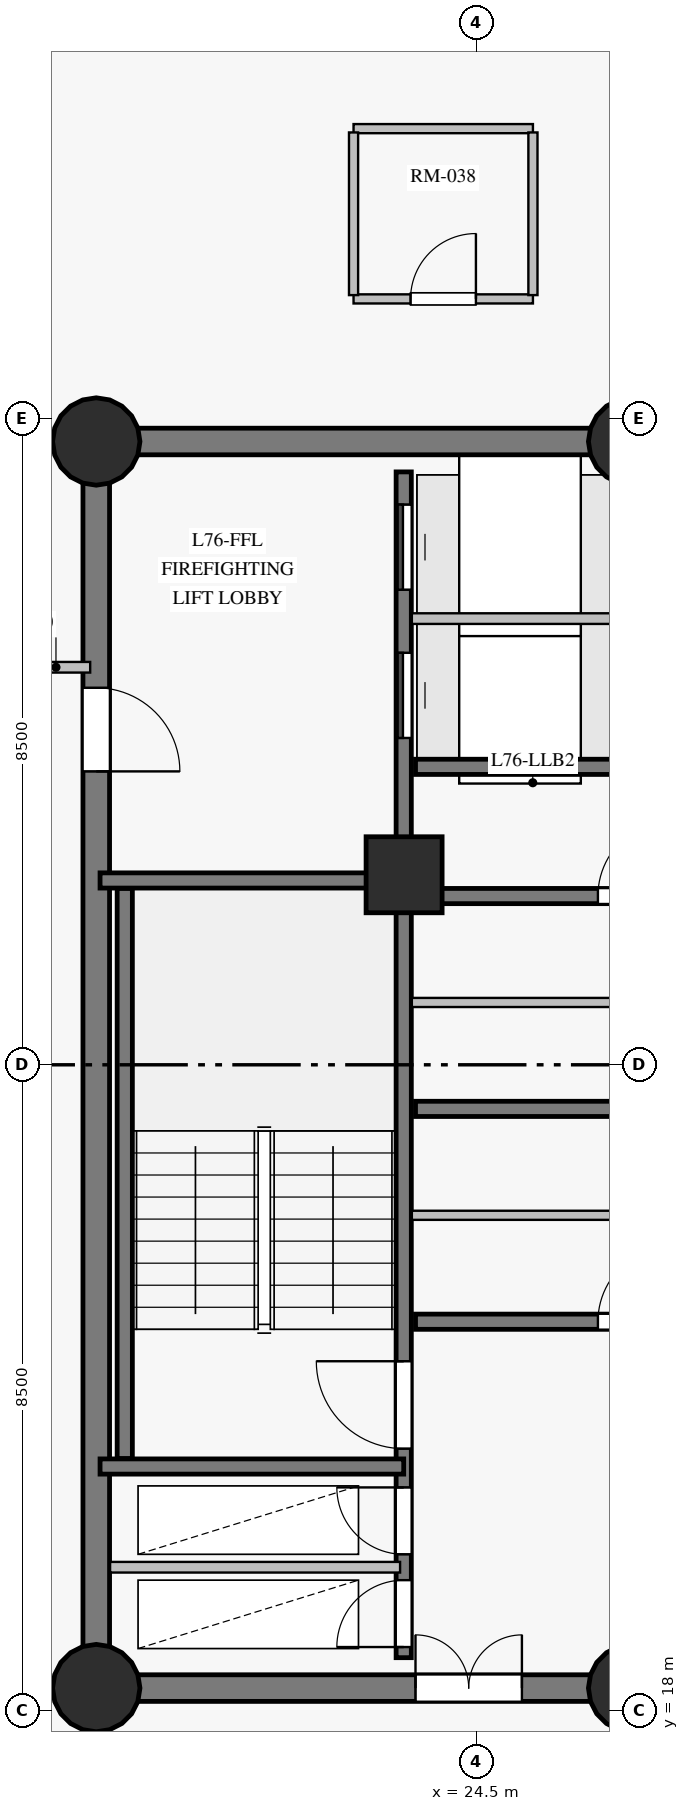
"""IFC4 building model, lengths in metres.
Left out: names, types, materials, properties, quantities, classifications, styles, units other than length and angle.
Written with IfcOpenShell. Run it as: python <this file> out.ifc"""

import sys

from ifc_helpers import new_model, si_unit, direction, frame, frame_2d, origin, origin_with_axes, origin_2d, place, context, subcontext, project, spatial, rectangle, circle, extrude, source, transform, mapped, element, fill, save


model = new_model("IFC4")
c1 = context("Model", 3, precision=1e-05, world=origin(), true_north=direction((0.0, 1.0)))
c2 = subcontext(c1, "Body", "Model", "MODEL_VIEW")
j1 = project(units=[si_unit("LENGTHUNIT", "METRE"), si_unit("PLANEANGLEUNIT", "RADIAN")], contexts=[c1])
p1 = place(None, origin())
s1 = spatial("IfcSite", under=j1, at=p1, CompositionType="ELEMENT")
p2 = place(p1, origin())
s2 = spatial("IfcBuilding", under=s1, at=p2, CompositionType="ELEMENT")
p3 = place(p2, frame((0.0, 0.0, 256.55)))
s3 = spatial("IfcBuildingStorey", under=s2, at=p3, CompositionType="ELEMENT", Elevation=256.55)
p4 = place(p3, frame((19.5, 18.3, 0.0), z_axis=(0.0, 0.0, 1.0), x_axis=(1.0, 0.0, 0.0)))
e1 = element("IfcWall", 1, at=p4, inside=s3, PredefinedType="SHEAR", context=c2, shape_type="SweptSolid", body=[
    extrude(rectangle(XDim=7.05, YDim=0.35, at=frame_2d((3.525, 0.0))), origin(), (0.0, 0.0, 1.0), 2.85),
])
p5 = place(p4, frame((4.2, 0.0, 0.0)))
e2 = element("IfcOpeningElement", 2, at=p5, cuts=e1, PredefinedType="OPENING", context=c2, shape_type="SweptSolid", body=[
    extrude(rectangle(XDim=1.4, YDim=2.2, at=frame_2d((0.7, 1.1))), frame((0.0, 0.185, 0.0), z_axis=(0.0, -1.0, 0.0), x_axis=(1.0, 0.0, 0.0)), (0.0, 0.0, 1.0), 0.37),
])
p6 = place(p3, frame((26.55, 34.7, 0.0), z_axis=(0.0, 0.0, 1.0), x_axis=(-1.0, 0.0, 0.0)))
e3 = element("IfcWall", 3, at=p6, inside=s3, PredefinedType="SHEAR", context=c2, shape_type="SweptSolid", body=[
    extrude(rectangle(XDim=7.05, YDim=0.35, at=frame_2d((3.525, 0.0))), origin(), (0.0, 0.0, 1.0), 2.85),
])
p7 = place(p3, frame((19.5, 34.7, 0.0), z_axis=(0.0, 0.0, 1.0), x_axis=(0.0, -1.0, 0.0)))
e4 = element("IfcWall", 4, at=p7, inside=s3, PredefinedType="SHEAR", context=c2, shape_type="SweptSolid", body=[
    extrude(rectangle(XDim=16.4, YDim=0.35, at=frame_2d((8.2, 0.0))), origin(), (0.0, 0.0, 1.0), 2.85),
])
p8 = place(p7, frame((3.24, 0.0, 0.0)))
e5 = element("IfcOpeningElement", 5, at=p8, cuts=e4, PredefinedType="OPENING", context=c2, shape_type="SweptSolid", body=[
    extrude(rectangle(XDim=1.1, YDim=2.15, at=frame_2d((0.55, 1.075))), frame((0.0, 0.185, 0.0), z_axis=(0.0, -1.0, 0.0), x_axis=(1.0, 0.0, 0.0)), (0.0, 0.0, 1.0), 0.37),
])
m1 = source(origin_with_axes(), c2, "Body", "SweptSolid", [
    extrude(circle(Radius=0.575, at=origin_2d()), origin(), (0.0, 0.0, 1.0), 3.05),
])
for number, where, z_axis, x_axis in (
    (6, (19.5, 18.3, 0.0), (0.0, 0.0, 1.0), (1.0, 0.0, 0.0)),
    (7, (26.55, 18.3, 0.0), (0.0, 0.0, 1.0), (1.0, 0.0, 0.0)),
    (8, (19.5, 34.7, 0.0), (0.0, 0.0, 1.0), (1.0, 0.0, 0.0)),
    (9, (26.55, 34.7, 0.0), (0.0, 0.0, 1.0), (1.0, 0.0, 0.0)),
):
    element("IfcColumn", number, at=place(p3, frame(where, z_axis=z_axis, x_axis=x_axis)), inside=s3, PredefinedType="COLUMN", context=c2, shape_type="MappedRepresentation", body=[
        mapped(m1, transform((0.0, 0.0, 0.0), scale=1.0)),
    ])
m2 = source(origin_with_axes(), c2, "Body", "SweptSolid", [
    extrude(rectangle(XDim=1.0, YDim=1.0, at=origin_2d()), origin(), (0.0, 0.0, 1.0), 3.05),
])
p9 = place(p3, frame((23.55, 29.0, 0.0), z_axis=(0.0, 0.0, 1.0), x_axis=(1.0, 0.0, 0.0)))
e10 = element("IfcColumn", 10, at=p9, inside=s3, PredefinedType="COLUMN", context=c2, shape_type="MappedRepresentation", body=[
    mapped(m2, transform((0.0, 0.0, 0.0), scale=1.0)),
])
p10 = place(p3, frame((25.545, 45.394, 0.0), z_axis=(0.0, 0.0, 1.0), x_axis=(-0.841254258946, -0.540639687597, 0.0)))
e11 = element("IfcWall", 11, at=p10, inside=s3, PredefinedType="SOLIDWALL", context=c2, shape_type="SweptSolid", body=[
    extrude(rectangle(XDim=12.036, YDim=0.28, at=frame_2d((6.018, 0.0))), origin(), (0.0, 0.0, 1.0), 2.85),
])
p11 = place(p10, frame((1.459, 0.0, 0.85)))
e12 = element("IfcOpeningElement", 12, at=p11, cuts=e11, PredefinedType="OPENING", context=c2, shape_type="SweptSolid", body=[
    extrude(rectangle(XDim=1.6, YDim=1.6, at=frame_2d((0.8, 0.8))), frame((0.0, 0.15, 0.0), z_axis=(0.0, -1.0, 0.0), x_axis=(1.0, 0.0, 0.0)), (0.0, 0.0, 1.0), 0.3),
])
p12 = place(p10, frame((5.218, 0.0, 0.85)))
e13 = element("IfcOpeningElement", 13, at=p12, cuts=e11, PredefinedType="OPENING", context=c2, shape_type="SweptSolid", body=[
    extrude(rectangle(XDim=1.6, YDim=1.6, at=frame_2d((0.8, 0.8))), frame((0.0, 0.15, 0.0), z_axis=(0.0, -1.0, 0.0), x_axis=(1.0, 0.0, 0.0)), (0.0, 0.0, 1.0), 0.3),
])
p13 = place(p10, frame((8.977, 0.0, 0.85)))
e14 = element("IfcOpeningElement", 14, at=p13, cuts=e11, PredefinedType="OPENING", context=c2, shape_type="SweptSolid", body=[
    extrude(rectangle(XDim=1.6, YDim=1.6, at=frame_2d((0.8, 0.8))), frame((0.0, 0.15, 0.0), z_axis=(0.0, -1.0, 0.0), x_axis=(1.0, 0.0, 0.0)), (0.0, 0.0, 1.0), 0.3),
])
p14 = place(p3, frame((23.545, 18.7, 0.0), z_axis=(0.0, 0.0, 1.0), x_axis=(0.0, 1.0, 0.0)))
e15 = element("IfcWall", 15, at=p14, inside=s3, PredefinedType="SHEAR", context=c2, shape_type="SweptSolid", body=[
    extrude(rectangle(XDim=15.6, YDim=0.2, at=frame_2d((7.8, 0.0))), origin(), (0.0, 0.0, 1.0), 2.85),
])
p15 = place(p14, frame((2.75, 0.0, 0.0)))
e16 = element("IfcOpeningElement", 16, at=p15, cuts=e15, PredefinedType="OPENING", context=c2, shape_type="SweptSolid", body=[
    extrude(rectangle(XDim=1.15, YDim=2.15, at=frame_2d((0.575, 1.075))), frame((0.0, 0.11, 0.0), z_axis=(0.0, -1.0, 0.0), x_axis=(1.0, 0.0, 0.0)), (0.0, 0.0, 1.0), 0.22),
])
p16 = place(p14, frame((0.14, 0.0, 0.0)))
e17 = element("IfcOpeningElement", 17, at=p16, cuts=e15, PredefinedType="OPENING", context=c2, shape_type="SweptSolid", body=[
    extrude(rectangle(XDim=0.88, YDim=2.1, at=frame_2d((0.44, 1.05))), frame((0.0, 0.11, 0.0), z_axis=(0.0, -1.0, 0.0), x_axis=(1.0, 0.0, 0.0)), (0.0, 0.0, 1.0), 0.22),
])
p17 = place(p14, frame((1.36, 0.0, 0.0)))
e18 = element("IfcOpeningElement", 18, at=p17, cuts=e15, PredefinedType="OPENING", context=c2, shape_type="SweptSolid", body=[
    extrude(rectangle(XDim=0.88, YDim=2.1, at=frame_2d((0.44, 1.05))), frame((0.0, 0.11, 0.0), z_axis=(0.0, -1.0, 0.0), x_axis=(1.0, 0.0, 0.0)), (0.0, 0.0, 1.0), 0.22),
])
p18 = place(p14, frame((12.1, 0.0, 0.0)))
e19 = element("IfcOpeningElement", 19, at=p18, cuts=e15, PredefinedType="OPENING", context=c2, shape_type="SweptSolid", body=[
    extrude(rectangle(XDim=1.12, YDim=2.15, at=frame_2d((0.56, 1.075))), frame((0.0, 0.11, 0.0), z_axis=(0.0, -1.0, 0.0), x_axis=(1.0, 0.0, 0.0)), (0.0, 0.0, 1.0), 0.22),
])
p19 = place(p14, frame((14.05, 0.0, 0.0)))
e20 = element("IfcOpeningElement", 20, at=p19, cuts=e15, PredefinedType="OPENING", context=c2, shape_type="SweptSolid", body=[
    extrude(rectangle(XDim=1.12, YDim=2.15, at=frame_2d((0.56, 1.075))), frame((0.0, 0.11, 0.0), z_axis=(0.0, -1.0, 0.0), x_axis=(1.0, 0.0, 0.0)), (0.0, 0.0, 1.0), 0.22),
])
p20 = place(p3, frame((23.7, 23.12, 0.0), z_axis=(0.0, 0.0, 1.0), x_axis=(1.0, 0.0, 0.0)))
e21 = element("IfcWall", 21, at=p20, inside=s3, PredefinedType="SHEAR", context=c2, shape_type="SweptSolid", body=[
    extrude(rectangle(XDim=9.6, YDim=0.2, at=frame_2d((4.8, 0.0))), origin(), (0.0, 0.0, 1.0), 2.85),
])
p21 = place(p20, frame((2.4, 0.0, 0.0)))
e22 = element("IfcOpeningElement", 22, at=p21, cuts=e21, PredefinedType="OPENING", context=c2, shape_type="SweptSolid", body=[
    extrude(rectangle(XDim=1.0, YDim=2.15, at=frame_2d((0.5, 1.075))), frame((0.0, 0.11, 0.0), z_axis=(0.0, -1.0, 0.0), x_axis=(1.0, 0.0, 0.0)), (0.0, 0.0, 1.0), 0.22),
])
p22 = place(p3, frame((23.7, 25.92, 0.0), z_axis=(0.0, 0.0, 1.0), x_axis=(1.0, 0.0, 0.0)))
e23 = element("IfcWall", 23, at=p22, inside=s3, PredefinedType="SHEAR", context=c2, shape_type="SweptSolid", body=[
    extrude(rectangle(XDim=9.6, YDim=0.2, at=frame_2d((4.8, 0.0))), origin(), (0.0, 0.0, 1.0), 2.85),
])
p23 = place(p3, frame((23.7, 28.72, 0.0), z_axis=(0.0, 0.0, 1.0), x_axis=(1.0, 0.0, 0.0)))
e24 = element("IfcWall", 24, at=p23, inside=s3, PredefinedType="SHEAR", context=c2, shape_type="SweptSolid", body=[
    extrude(rectangle(XDim=9.6, YDim=0.2, at=frame_2d((4.8, 0.0))), origin(), (0.0, 0.0, 1.0), 2.85),
])
p24 = place(p23, frame((2.4, 0.0, 0.0)))
e25 = element("IfcOpeningElement", 25, at=p24, cuts=e24, PredefinedType="OPENING", context=c2, shape_type="SweptSolid", body=[
    extrude(rectangle(XDim=1.0, YDim=2.15, at=frame_2d((0.5, 1.075))), frame((0.0, 0.11, 0.0), z_axis=(0.0, -1.0, 0.0), x_axis=(1.0, 0.0, 0.0)), (0.0, 0.0, 1.0), 0.22),
])
p25 = place(p3, frame((19.875, 21.32, 0.0), z_axis=(0.0, 0.0, 1.0), x_axis=(0.0, 1.0, 0.0)))
e26 = element("IfcWall", 26, at=p25, inside=s3, PredefinedType="SHEAR", context=c2, shape_type="SweptSolid", body=[
    extrude(rectangle(XDim=7.5, YDim=0.2, at=frame_2d((3.75, 0.0))), origin(), (0.0, 0.0, 1.0), 2.85),
])
for number, where, z_axis, x_axis in (
    (27, (19.55, 21.215, 0.0), (0.0, 0.0, 1.0), (1.0, 0.0, 0.0)),
    (28, (19.55, 28.925, 0.0), (0.0, 0.0, 1.0), (1.0, 0.0, 0.0)),
):
    element("IfcWall", number, at=place(p3, frame(where, z_axis=z_axis, x_axis=x_axis)), inside=s3, PredefinedType="SHEAR", context=c2, shape_type="SweptSolid", body=[
        extrude(rectangle(XDim=3.995, YDim=0.2, at=frame_2d((1.998, 0.0))), origin(), (0.0, 0.0, 1.0), 2.85),
    ])
p26 = place(p3, frame((23.7, 30.42, 0.0), z_axis=(0.0, 0.0, 1.0), x_axis=(1.0, 0.0, 0.0)))
e29 = element("IfcWall", 29, at=p26, inside=s3, PredefinedType="SHEAR", context=c2, shape_type="SweptSolid", body=[
    extrude(rectangle(XDim=2.78, YDim=0.2, at=frame_2d((1.39, 0.0))), origin(), (0.0, 0.0, 1.0), 2.85),
])
p27 = place(p3, frame((23.652, 24.52, 0.0), z_axis=(0.0, 0.0, 1.0), x_axis=(1.0, 0.0, 0.0)))
e30 = element("IfcWall", 30, at=p27, inside=s3, PredefinedType="PARTITIONING", context=c2, shape_type="SweptSolid", body=[
    extrude(rectangle(XDim=9.698, YDim=0.12, at=frame_2d((4.849, 0.0))), origin(), (0.0, 0.0, 1.0), 2.85),
])
p28 = place(p27, frame((4.2, 0.0, 0.0)))
e31 = element("IfcOpeningElement", 31, at=p28, cuts=e30, PredefinedType="OPENING", context=c2, shape_type="SweptSolid", body=[
    extrude(rectangle(XDim=0.94, YDim=2.1, at=frame_2d((0.47, 1.05))), frame((0.0, 0.07, 0.0), z_axis=(0.0, -1.0, 0.0), x_axis=(1.0, 0.0, 0.0)), (0.0, 0.0, 1.0), 0.14),
])
p29 = place(p3, frame((23.652, 27.32, 0.0), z_axis=(0.0, 0.0, 1.0), x_axis=(1.0, 0.0, 0.0)))
e32 = element("IfcWall", 32, at=p29, inside=s3, PredefinedType="PARTITIONING", context=c2, shape_type="SweptSolid", body=[
    extrude(rectangle(XDim=9.698, YDim=0.12, at=frame_2d((4.849, 0.0))), origin(), (0.0, 0.0, 1.0), 2.85),
])
p30 = place(p29, frame((4.2, 0.0, 0.0)))
e33 = element("IfcOpeningElement", 33, at=p30, cuts=e32, PredefinedType="OPENING", context=c2, shape_type="SweptSolid", body=[
    extrude(rectangle(XDim=0.94, YDim=2.1, at=frame_2d((0.47, 1.05))), frame((0.0, 0.07, 0.0), z_axis=(0.0, -1.0, 0.0), x_axis=(1.0, 0.0, 0.0)), (0.0, 0.0, 1.0), 0.14),
])
p31 = place(p3, frame((19.682, 19.89, 0.0), z_axis=(0.0, 0.0, 1.0), x_axis=(1.0, 0.0, 0.0)))
e34 = element("IfcWall", 34, at=p31, inside=s3, PredefinedType="PARTITIONING", context=c2, shape_type="SweptSolid", body=[
    extrude(rectangle(XDim=3.815, YDim=0.14, at=frame_2d((1.908, 0.0))), origin(), (0.0, 0.0, 1.0), 2.85),
])
p32 = place(p3, frame((23.652, 32.37, 0.0), z_axis=(0.0, 0.0, 1.0), x_axis=(1.0, 0.0, 0.0)))
e35 = element("IfcWall", 35, at=p32, inside=s3, PredefinedType="PARTITIONING", context=c2, shape_type="SweptSolid", body=[
    extrude(rectangle(XDim=2.828, YDim=0.14, at=frame_2d((1.414, 0.0))), origin(), (0.0, 0.0, 1.0), 2.85),
])
p33 = place(p3, frame((19.42, 31.73, 0.0), z_axis=(0.0, 0.0, 1.0), x_axis=(-1.0, 0.0, 0.0)))
e36 = element("IfcWall", 36, at=p33, inside=s3, PredefinedType="PARTITIONING", context=c2, shape_type="SweptSolid", body=[
    extrude(rectangle(XDim=2.75, YDim=0.14, at=frame_2d((1.375, 0.0))), origin(), (0.0, 0.0, 1.0), 2.85),
])
p34 = place(p33, frame((0.9, 0.0, 0.0)))
e37 = element("IfcOpeningElement", 37, at=p34, cuts=e36, PredefinedType="OPENING", context=c2, shape_type="SweptSolid", body=[
    extrude(rectangle(XDim=0.96, YDim=2.15, at=frame_2d((0.48, 1.075))), frame((0.0, 0.08, 0.0), z_axis=(0.0, -1.0, 0.0), x_axis=(1.0, 0.0, 0.0)), (0.0, 0.0, 1.0), 0.16),
])
p35 = place(p3, frame((22.885, 36.576, 0.0), z_axis=(0.0, 0.0, 1.0), x_axis=(1.0, 0.0, 0.0)))
e38 = element("IfcWall", 38, at=p35, inside=s3, PredefinedType="PARTITIONING", context=c2, shape_type="SweptSolid", body=[
    extrude(rectangle(XDim=2.36, YDim=0.12, at=frame_2d((1.18, 0.0))), origin(), (0.0, 0.0, 1.0), 2.45),
])
p36 = place(p35, frame((0.75, 0.0, 0.0)))
e39 = element("IfcOpeningElement", 39, at=p36, cuts=e38, PredefinedType="OPENING", context=c2, shape_type="SweptSolid", body=[
    extrude(rectangle(XDim=0.86, YDim=2.1, at=frame_2d((0.43, 1.05))), frame((0.0, 0.07, 0.0), z_axis=(0.0, -1.0, 0.0), x_axis=(1.0, 0.0, 0.0)), (0.0, 0.0, 1.0), 0.14),
])
p37 = place(p3, frame((25.245, 38.816, 0.0), z_axis=(0.0, 0.0, 1.0), x_axis=(-1.0, 0.0, 0.0)))
e40 = element("IfcWall", 40, at=p37, inside=s3, PredefinedType="PARTITIONING", context=c2, shape_type="SweptSolid", body=[
    extrude(rectangle(XDim=2.36, YDim=0.12, at=frame_2d((1.18, 0.0))), origin(), (0.0, 0.0, 1.0), 2.3),
])
for number, where, z_axis, x_axis in (
    (41, (25.245, 36.626, 0.0), (0.0, 0.0, 1.0), (0.0, 1.0, 0.0)),
    (42, (22.885, 38.766, 0.0), (0.0, 0.0, 1.0), (0.0, -1.0, 0.0)),
):
    element("IfcWall", number, at=place(p3, frame(where, z_axis=z_axis, x_axis=x_axis)), inside=s3, PredefinedType="PARTITIONING", context=c2, shape_type="SweptSolid", body=[
        extrude(rectangle(XDim=2.14, YDim=0.12, at=frame_2d((1.07, 0.0))), origin(), (0.0, 0.0, 1.0), 2.85),
    ])
m3 = source(origin_with_axes(), c2, "Body", "SweptSolid", [
    extrude(rectangle(XDim=1.15, YDim=2.15, at=frame_2d((0.575, 1.075))), frame((0.0, 0.025, 0.0), z_axis=(0.0, -1.0, 0.0), x_axis=(1.0, 0.0, 0.0)), (0.0, 0.0, 1.0), 0.05),
])
p38 = place(p15, origin())
e43 = element("IfcDoor", 43, at=p38, inside=s3, OperationType="SINGLE_SWING_RIGHT", PredefinedType="DOOR", context=c2, shape_type="MappedRepresentation", body=[
    mapped(m3, transform((0.0, 0.0, 0.0), scale=1.0)),
])
fill(e16, e43)
m4 = source(origin_with_axes(), c2, "Body", "SweptSolid", [
    extrude(rectangle(XDim=1.1, YDim=2.15, at=frame_2d((0.55, 1.075))), frame((0.0, 0.025, 0.0), z_axis=(0.0, -1.0, 0.0), x_axis=(1.0, 0.0, 0.0)), (0.0, 0.0, 1.0), 0.05),
])
p39 = place(p8, origin())
e44 = element("IfcDoor", 44, at=p39, inside=s3, OperationType="SINGLE_SWING_RIGHT", PredefinedType="DOOR", context=c2, shape_type="MappedRepresentation", body=[
    mapped(m4, transform((0.0, 0.0, 0.0), scale=1.0)),
])
fill(e5, e44)
m5 = source(origin_with_axes(), c2, "Body", "SweptSolid", [
    extrude(rectangle(XDim=0.88, YDim=2.1, at=frame_2d((0.44, 1.05))), frame((0.0, 0.025, 0.0), z_axis=(0.0, -1.0, 0.0), x_axis=(1.0, 0.0, 0.0)), (0.0, 0.0, 1.0), 0.05),
])
p40 = place(p16, origin())
e45 = element("IfcDoor", 45, at=p40, inside=s3, OperationType="SINGLE_SWING_LEFT", PredefinedType="DOOR", context=c2, shape_type="MappedRepresentation", body=[
    mapped(m5, transform((0.0, 0.0, 0.0), scale=1.0)),
])
fill(e17, e45)
p41 = place(p17, origin())
e46 = element("IfcDoor", 46, at=p41, inside=s3, OperationType="SINGLE_SWING_RIGHT", PredefinedType="DOOR", context=c2, shape_type="MappedRepresentation", body=[
    mapped(m5, transform((0.0, 0.0, 0.0), scale=1.0)),
])
fill(e18, e46)
m6 = source(origin_with_axes(), c2, "Body", "SweptSolid", [
    extrude(rectangle(XDim=1.4, YDim=2.2, at=frame_2d((0.7, 1.1))), frame((0.0, 0.025, 0.0), z_axis=(0.0, -1.0, 0.0), x_axis=(1.0, 0.0, 0.0)), (0.0, 0.0, 1.0), 0.05),
])
p42 = place(p5, origin())
e47 = element("IfcDoor", 47, at=p42, inside=s3, OperationType="DOUBLE_DOOR_SINGLE_SWING", PredefinedType="DOOR", context=c2, shape_type="MappedRepresentation", body=[
    mapped(m6, transform((0.0, 0.0, 0.0), scale=1.0)),
])
fill(e2, e47)
m7 = source(origin_with_axes(), c2, "Body", "SweptSolid", [
    extrude(rectangle(XDim=1.0, YDim=2.15, at=frame_2d((0.5, 1.075))), frame((0.0, 0.025, 0.0), z_axis=(0.0, -1.0, 0.0), x_axis=(1.0, 0.0, 0.0)), (0.0, 0.0, 1.0), 0.05),
])
p43 = place(p21, origin())
e48 = element("IfcDoor", 48, at=p43, inside=s3, OperationType="SINGLE_SWING_RIGHT", PredefinedType="DOOR", context=c2, shape_type="MappedRepresentation", body=[
    mapped(m7, transform((0.0, 0.0, 0.0), scale=1.0)),
])
fill(e22, e48)
p44 = place(p24, origin())
e49 = element("IfcDoor", 49, at=p44, inside=s3, OperationType="SINGLE_SWING_RIGHT", PredefinedType="DOOR", context=c2, shape_type="MappedRepresentation", body=[
    mapped(m7, transform((0.0, 0.0, 0.0), scale=1.0)),
])
fill(e25, e49)
m8 = source(origin_with_axes(), c2, "Body", "SweptSolid", [
    extrude(rectangle(XDim=1.12, YDim=2.15, at=frame_2d((0.56, 1.075))), frame((0.0, 0.025, 0.0), z_axis=(0.0, -1.0, 0.0), x_axis=(1.0, 0.0, 0.0)), (0.0, 0.0, 1.0), 0.05),
])
p45 = place(p18, origin())
e50 = element("IfcDoor", 50, at=p45, inside=s3, OperationType="SLIDING_TO_LEFT", PredefinedType="DOOR", context=c2, shape_type="MappedRepresentation", body=[
    mapped(m8, transform((0.0, 0.0, 0.0), scale=1.0)),
])
fill(e19, e50)
p46 = place(p19, origin())
e51 = element("IfcDoor", 51, at=p46, inside=s3, OperationType="SLIDING_TO_RIGHT", PredefinedType="DOOR", context=c2, shape_type="MappedRepresentation", body=[
    mapped(m8, transform((0.0, 0.0, 0.0), scale=1.0)),
])
fill(e20, e51)
m9 = source(origin_with_axes(), c2, "Body", "SweptSolid", [
    extrude(rectangle(XDim=0.86, YDim=2.1, at=frame_2d((0.43, 1.05))), frame((0.0, 0.025, 0.0), z_axis=(0.0, -1.0, 0.0), x_axis=(1.0, 0.0, 0.0)), (0.0, 0.0, 1.0), 0.05),
])
p47 = place(p36, origin())
e52 = element("IfcDoor", 52, at=p47, inside=s3, OperationType="SINGLE_SWING_RIGHT", PredefinedType="DOOR", context=c2, shape_type="MappedRepresentation", body=[
    mapped(m9, transform((0.0, 0.0, 0.0), scale=1.0)),
])
fill(e39, e52)
save(model, sys.argv[1])
